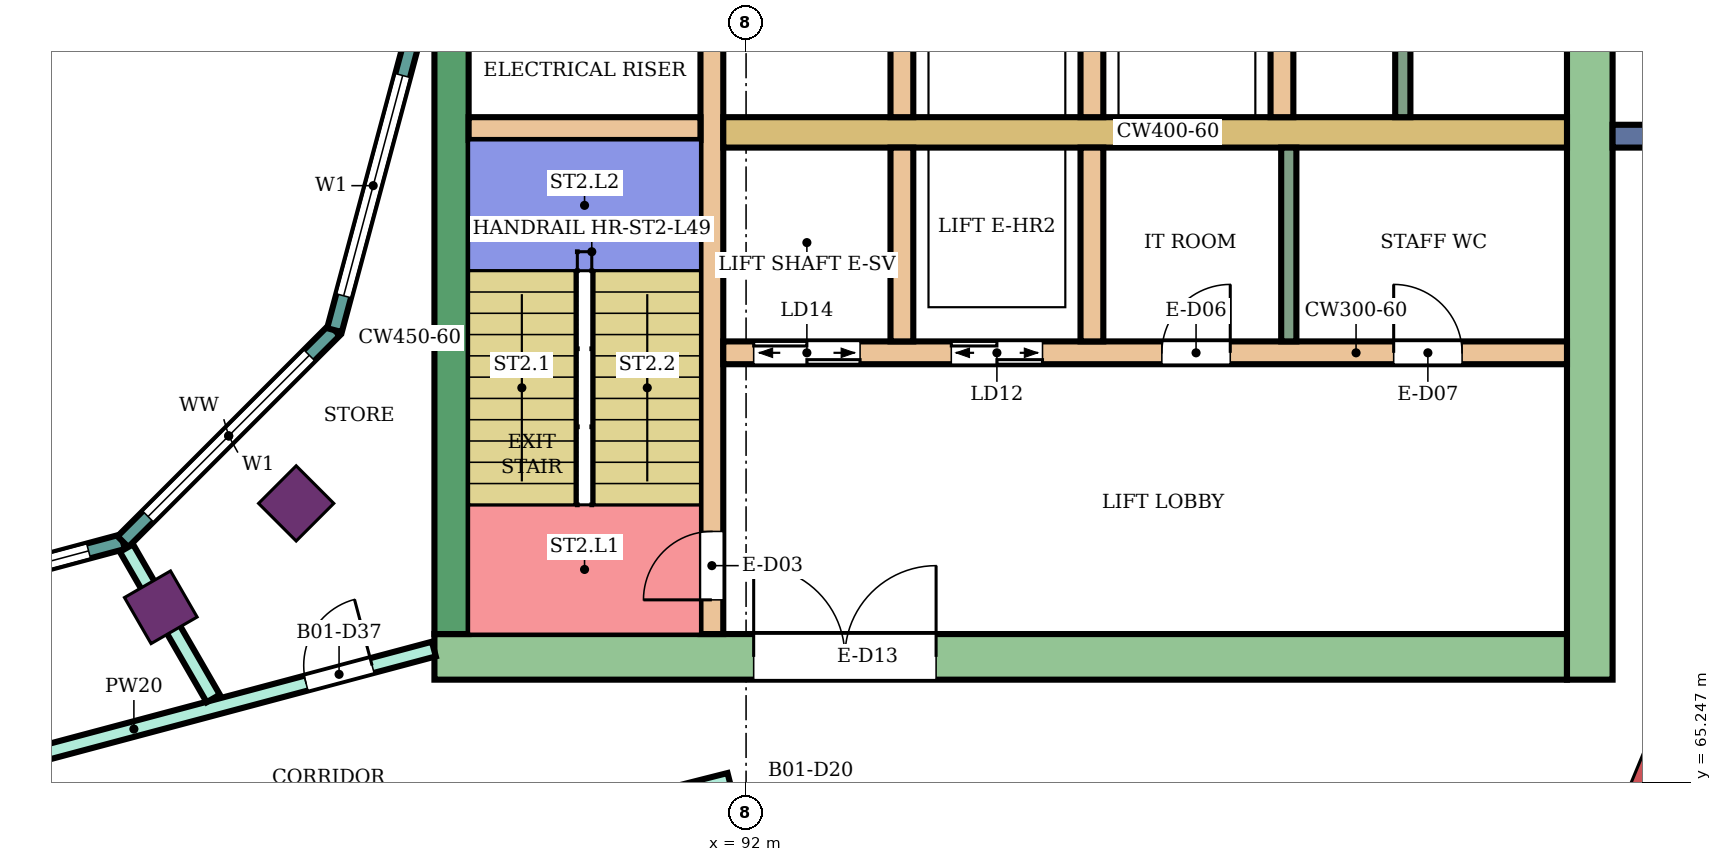
"""IFC4 building model, lengths in metres.
Left out: names, types, materials, properties, quantities, classifications, styles, units other than length and angle.
Written with IfcOpenShell. Run it as: python <this file> out.ifc"""

import sys

from ifc_helpers import new_model, si_unit, direction, frame, frame_2d, origin, origin_2d, place, context, subcontext, project, spatial, rectangle, extrude, element, fill, save


model = new_model("IFC4")
c1 = context("Model", 3, precision=1e-05, world=origin(), true_north=direction((0.0, 1.0)))
c2 = subcontext(c1, "Body", "Model", "MODEL_VIEW")
j1 = project(units=[si_unit("LENGTHUNIT", "METRE"), si_unit("PLANEANGLEUNIT", "RADIAN")], contexts=[c1])
p1 = place(None, origin())
s1 = spatial("IfcSite", under=j1, at=p1, CompositionType="ELEMENT")
p2 = place(p1, origin())
s2 = spatial("IfcBuilding", under=s1, at=p2, CompositionType="ELEMENT")
p3 = place(p2, frame((0.0, 0.0, 212.5)))
s3 = spatial("IfcBuildingStorey", under=s2, at=p3, CompositionType="ELEMENT", Elevation=212.5)
for number, where, z_axis, x_axis in (
    (1, (84.3, 67.552, 0.0), (0.0, 0.0, 1.0), (0.5, -0.866, 0.0)),
    (2, (86.081, 68.919, 0.0), (0.0, 0.0, 1.0), (0.707, -0.707, 0.0)),
):
    element("IfcColumn", number, at=place(p3, frame(where, z_axis=z_axis, x_axis=x_axis)), inside=s3, PredefinedType="COLUMN", context=c2, shape_type="SweptSolid", body=[
        extrude(rectangle(XDim=0.7, YDim=0.7, at=origin_2d()), origin(), (0.0, 0.0, 1.0), 4.2),
    ])
p4 = place(p3, frame((87.9, 66.9, 0.0), z_axis=(0.0, 0.0, 1.0), x_axis=(1.0, 0.0, 0.0)))
e3 = element("IfcWall", 3, at=p4, inside=s3, PredefinedType="SHEAR", context=c2, shape_type="SweptSolid", body=[
    extrude(rectangle(XDim=14.9, YDim=0.6, at=frame_2d((7.45, 0.0))), origin(), (0.0, 0.0, 1.0), 3.88),
])
p5 = place(p4, frame((4.2, 0.0, 0.0)))
e4 = element("IfcOpeningElement", 4, at=p5, cuts=e3, PredefinedType="OPENING", context=c2, shape_type="SweptSolid", body=[
    extrude(rectangle(XDim=2.4, YDim=2.4, at=frame_2d((1.2, 1.2))), frame((0.0, 0.31, 0.0), z_axis=(0.0, -1.0, 0.0), x_axis=(1.0, 0.0, 0.0)), (0.0, 0.0, 1.0), 0.62),
])
p6 = place(p3, frame((88.125, 67.2, 0.0), z_axis=(0.0, 0.0, 1.0), x_axis=(0.0, 1.0, 0.0)))
e5 = element("IfcWall", 5, at=p6, inside=s3, PredefinedType="SHEAR", context=c2, shape_type="SweptSolid", body=[
    extrude(rectangle(XDim=7.8, YDim=0.45, at=frame_2d((3.9, 0.0))), origin(), (0.0, 0.0, 1.0), 3.88),
])
p7 = place(p3, frame((103.1, 66.6, 0.0), z_axis=(0.0, 0.0, 1.0), x_axis=(0.0, 1.0, 0.0)))
e6 = element("IfcWall", 6, at=p7, inside=s3, PredefinedType="SHEAR", context=c2, shape_type="SweptSolid", body=[
    extrude(rectangle(XDim=16.8, YDim=0.6, at=frame_2d((8.4, 0.0))), origin(), (0.0, 0.0, 1.0), 3.88),
])
p8 = place(p3, frame((91.55, 67.2, 0.0), z_axis=(0.0, 0.0, 1.0), x_axis=(0.0, 1.0, 0.0)))
e7 = element("IfcWall", 7, at=p8, inside=s3, PredefinedType="SHEAR", context=c2, shape_type="SweptSolid", body=[
    extrude(rectangle(XDim=7.8, YDim=0.3, at=frame_2d((3.9, 0.0))), origin(), (0.0, 0.0, 1.0), 3.88),
])
p9 = place(p8, frame((0.45, 0.0, 0.0)))
e8 = element("IfcOpeningElement", 8, at=p9, cuts=e7, PredefinedType="OPENING", context=c2, shape_type="SweptSolid", body=[
    extrude(rectangle(XDim=0.9, YDim=2.1, at=frame_2d((0.45, 1.05))), frame((0.0, 0.16, 0.0), z_axis=(0.0, -1.0, 0.0), x_axis=(1.0, 0.0, 0.0)), (0.0, 0.0, 1.0), 0.32),
])
p10 = place(p3, frame((88.35, 73.85, 0.0), z_axis=(0.0, 0.0, 1.0), x_axis=(1.0, 0.0, 0.0)))
e9 = element("IfcWall", 9, at=p10, inside=s3, PredefinedType="SHEAR", context=c2, shape_type="SweptSolid", body=[
    extrude(rectangle(XDim=3.05, YDim=0.3, at=frame_2d((1.525, 0.0))), origin(), (0.0, 0.0, 1.0), 3.88),
])
p11 = place(p3, frame((91.7, 73.8, 0.0), z_axis=(0.0, 0.0, 1.0), x_axis=(1.0, 0.0, 0.0)))
e10 = element("IfcWall", 10, at=p11, inside=s3, PredefinedType="SHEAR", context=c2, shape_type="SweptSolid", body=[
    extrude(rectangle(XDim=11.1, YDim=0.4, at=frame_2d((5.55, 0.0))), origin(), (0.0, 0.0, 1.0), 3.88),
])
p12 = place(p3, frame((91.7, 70.9, 0.0), z_axis=(0.0, 0.0, 1.0), x_axis=(1.0, 0.0, 0.0)))
e11 = element("IfcWall", 11, at=p12, inside=s3, PredefinedType="SHEAR", context=c2, shape_type="SweptSolid", body=[
    extrude(rectangle(XDim=11.1, YDim=0.3, at=frame_2d((5.55, 0.0))), origin(), (0.0, 0.0, 1.0), 3.88),
])
p13 = place(p12, frame((0.4, 0.0, 0.0)))
e12 = element("IfcOpeningElement", 12, at=p13, cuts=e11, PredefinedType="OPENING", context=c2, shape_type="SweptSolid", body=[
    extrude(rectangle(XDim=1.4, YDim=2.1, at=frame_2d((0.7, 1.05))), frame((0.0, 0.16, 0.0), z_axis=(0.0, -1.0, 0.0), x_axis=(1.0, 0.0, 0.0)), (0.0, 0.0, 1.0), 0.32),
])
p14 = place(p12, frame((3.0, 0.0, 0.0)))
e13 = element("IfcOpeningElement", 13, at=p14, cuts=e11, PredefinedType="OPENING", context=c2, shape_type="SweptSolid", body=[
    extrude(rectangle(XDim=1.2, YDim=2.1, at=frame_2d((0.6, 1.05))), frame((0.0, 0.16, 0.0), z_axis=(0.0, -1.0, 0.0), x_axis=(1.0, 0.0, 0.0)), (0.0, 0.0, 1.0), 0.32),
])
p15 = place(p12, frame((5.77, 0.0, 0.0)))
e14 = element("IfcOpeningElement", 14, at=p15, cuts=e11, PredefinedType="OPENING", context=c2, shape_type="SweptSolid", body=[
    extrude(rectangle(XDim=0.9, YDim=2.1, at=frame_2d((0.45, 1.05))), frame((0.0, 0.16, 0.0), z_axis=(0.0, -1.0, 0.0), x_axis=(1.0, 0.0, 0.0)), (0.0, 0.0, 1.0), 0.32),
])
p16 = place(p12, frame((8.82, 0.0, 0.0)))
e15 = element("IfcOpeningElement", 15, at=p16, cuts=e11, PredefinedType="OPENING", context=c2, shape_type="SweptSolid", body=[
    extrude(rectangle(XDim=0.9, YDim=2.1, at=frame_2d((0.45, 1.05))), frame((0.0, 0.16, 0.0), z_axis=(0.0, -1.0, 0.0), x_axis=(1.0, 0.0, 0.0)), (0.0, 0.0, 1.0), 0.32),
])
for number, where, z_axis, x_axis in (
    (16, (94.05, 74.0, 0.0), (0.0, 0.0, 1.0), (0.0, 1.0, 0.0)),
    (17, (96.55, 74.0, 0.0), (0.0, 0.0, 1.0), (0.0, 1.0, 0.0)),
    (18, (99.05, 74.0, 0.0), (0.0, 0.0, 1.0), (0.0, 1.0, 0.0)),
    (19, (94.05, 71.05, 0.0), (0.0, 0.0, 1.0), (0.0, 1.0, 0.0)),
    (20, (96.55, 71.05, 0.0), (0.0, 0.0, 1.0), (0.0, 1.0, 0.0)),
):
    element("IfcWall", number, at=place(p3, frame(where, z_axis=z_axis, x_axis=x_axis)), inside=s3, PredefinedType="SHEAR", context=c2, shape_type="SweptSolid", body=[
        extrude(rectangle(XDim=2.55, YDim=0.3, at=frame_2d((1.275, 0.0))), origin(), (0.0, 0.0, 1.0), 3.88),
    ])
p17 = place(p3, frame((103.4, 73.75, 0.0), z_axis=(0.0, 0.0, 1.0), x_axis=(1.0, 0.0, 0.0)))
e21 = element("IfcWall", 21, at=p17, inside=s3, PredefinedType="NOTDEFINED", context=c2, shape_type="SweptSolid", body=[
    extrude(rectangle(XDim=2.416, YDim=0.3, at=frame_2d((1.208, 0.0))), origin(), (0.0, 0.0, 1.0), 4.2),
])
p18 = place(p3, frame((80.0, 67.396, 0.0), z_axis=(0.0, 0.0, 1.0), x_axis=(0.965933654434, 0.258789828301, 0.0)))
e22 = element("IfcWall", 22, at=p18, inside=s3, PredefinedType="NOTDEFINED", context=c2, shape_type="SweptSolid", body=[
    extrude(rectangle(XDim=3.936, YDim=0.2, at=frame_2d((1.968, 0.0))), origin(), (0.0, 0.0, 1.0), 4.2),
])
p19 = place(p18, frame((0.468, 0.0, 0.9)))
e23 = element("IfcOpeningElement", 23, at=p19, cuts=e22, PredefinedType="OPENING", context=c2, shape_type="SweptSolid", body=[
    extrude(rectangle(XDim=3.0, YDim=2.3, at=frame_2d((1.5, 1.15))), frame((0.0, 0.11, 0.0), z_axis=(0.0, -1.0, 0.0), x_axis=(1.0, 0.0, 0.0)), (0.0, 0.0, 1.0), 0.22),
])
p20 = place(p3, frame((83.802, 68.415, 0.0), z_axis=(0.0, 0.0, 1.0), x_axis=(0.707106781187, 0.707106781187, 0.0)))
e24 = element("IfcWall", 24, at=p20, inside=s3, PredefinedType="NOTDEFINED", context=c2, shape_type="SweptSolid", body=[
    extrude(rectangle(XDim=3.936, YDim=0.2, at=frame_2d((1.968, 0.0))), origin(), (0.0, 0.0, 1.0), 4.2),
])
p21 = place(p20, frame((0.468, 0.0, 0.9)))
e25 = element("IfcOpeningElement", 25, at=p21, cuts=e24, PredefinedType="OPENING", context=c2, shape_type="SweptSolid", body=[
    extrude(rectangle(XDim=3.0, YDim=2.3, at=frame_2d((1.5, 1.15))), frame((0.0, 0.11, 0.0), z_axis=(0.0, -1.0, 0.0), x_axis=(1.0, 0.0, 0.0)), (0.0, 0.0, 1.0), 0.22),
])
p22 = place(p3, frame((86.585, 71.198, 0.0), z_axis=(0.0, 0.0, 1.0), x_axis=(0.258789828301, 0.965933654434, 0.0)))
e26 = element("IfcWall", 26, at=p22, inside=s3, PredefinedType="NOTDEFINED", context=c2, shape_type="SweptSolid", body=[
    extrude(rectangle(XDim=3.936, YDim=0.2, at=frame_2d((1.968, 0.0))), origin(), (0.0, 0.0, 1.0), 4.2),
])
p23 = place(p22, frame((0.468, 0.0, 0.9)))
e27 = element("IfcOpeningElement", 27, at=p23, cuts=e26, PredefinedType="OPENING", context=c2, shape_type="SweptSolid", body=[
    extrude(rectangle(XDim=3.0, YDim=2.3, at=frame_2d((1.5, 1.15))), frame((0.0, 0.11, 0.0), z_axis=(0.0, -1.0, 0.0), x_axis=(1.0, 0.0, 0.0)), (0.0, 0.0, 1.0), 0.22),
])
p24 = place(p3, frame((80.0, 64.898, 0.0), z_axis=(0.0, 0.0, 1.0), x_axis=(0.966237419782, 0.257653349704, 0.0)))
e28 = element("IfcWall", 28, at=p24, inside=s3, PredefinedType="PARTITIONING", context=c2, shape_type="SweptSolid", body=[
    extrude(rectangle(XDim=8.169, YDim=0.2, at=frame_2d((4.084, 0.0))), origin(), (0.0, 0.0, 1.0), 3.75),
])
p25 = place(p24, frame((6.428, 0.0, 0.0)))
e29 = element("IfcOpeningElement", 29, at=p25, cuts=e28, PredefinedType="OPENING", context=c2, shape_type="SweptSolid", body=[
    extrude(rectangle(XDim=0.9, YDim=2.1, at=frame_2d((0.45, 1.05))), frame((0.0, 0.11, 0.0), z_axis=(0.0, -1.0, 0.0), x_axis=(1.0, 0.0, 0.0)), (0.0, 0.0, 1.0), 0.22),
])
p26 = place(p3, frame((83.848, 68.331, 0.0), z_axis=(0.0, 0.0, 1.0), x_axis=(0.499851978358, -0.866110847255, 0.0)))
e30 = element("IfcWall", 30, at=p26, inside=s3, PredefinedType="PARTITIONING", context=c2, shape_type="SweptSolid", body=[
    extrude(rectangle(XDim=2.284, YDim=0.2, at=frame_2d((1.142, 0.0))), origin(), (0.0, 0.0, 1.0), 3.75),
])
p27 = place(p3, frame((86.053, 63.826, 0.0), z_axis=(0.0, 0.0, 1.0), x_axis=(0.969490004987, 0.245130843083, 0.0)))
e31 = element("IfcWall", 31, at=p27, inside=s3, PredefinedType="PARTITIONING", context=c2, shape_type="SweptSolid", body=[
    extrude(rectangle(XDim=5.908, YDim=0.2, at=frame_2d((2.954, 0.0))), origin(), (0.0, 0.0, 1.0), 3.75),
])
for number, where, z_axis, x_axis in (
    (32, (100.64, 74.0, 0.0), (0.0, 0.0, 1.0), (0.0, 1.0, 0.0)),
    (33, (99.14, 71.05, 0.0), (0.0, 0.0, 1.0), (0.0, 1.0, 0.0)),
):
    element("IfcWall", number, at=place(p3, frame(where, z_axis=z_axis, x_axis=x_axis)), inside=s3, PredefinedType="PARTITIONING", context=c2, shape_type="SweptSolid", body=[
        extrude(rectangle(XDim=2.55, YDim=0.2, at=frame_2d((1.275, 0.0))), origin(), (0.0, 0.0, 1.0), 3.88),
    ])
p28 = place(p19, origin())
e34 = element("IfcWindow", 34, at=p28, inside=s3, PartitioningType="SINGLE_PANEL", PredefinedType="WINDOW", context=c2, shape_type="SweptSolid", body=[
    extrude(rectangle(XDim=3.0, YDim=2.3, at=frame_2d((1.5, 1.15))), frame((0.0, 0.03, 0.0), z_axis=(0.0, -1.0, 0.0), x_axis=(1.0, 0.0, 0.0)), (0.0, 0.0, 1.0), 0.06),
])
fill(e23, e34)
p29 = place(p21, origin())
e35 = element("IfcWindow", 35, at=p29, inside=s3, PartitioningType="SINGLE_PANEL", PredefinedType="WINDOW", context=c2, shape_type="SweptSolid", body=[
    extrude(rectangle(XDim=3.0, YDim=2.3, at=frame_2d((1.5, 1.15))), frame((0.0, 0.03, 0.0), z_axis=(0.0, -1.0, 0.0), x_axis=(1.0, 0.0, 0.0)), (0.0, 0.0, 1.0), 0.06),
])
fill(e25, e35)
p30 = place(p23, origin())
e36 = element("IfcWindow", 36, at=p30, inside=s3, PartitioningType="SINGLE_PANEL", PredefinedType="WINDOW", context=c2, shape_type="SweptSolid", body=[
    extrude(rectangle(XDim=3.0, YDim=2.3, at=frame_2d((1.5, 1.15))), frame((0.0, 0.03, 0.0), z_axis=(0.0, -1.0, 0.0), x_axis=(1.0, 0.0, 0.0)), (0.0, 0.0, 1.0), 0.06),
])
fill(e27, e36)
p31 = place(p25, origin())
e37 = element("IfcDoor", 37, at=p31, inside=s3, OperationType="SINGLE_SWING_RIGHT", PredefinedType="DOOR", context=c2, shape_type="SweptSolid", body=[
    extrude(rectangle(XDim=0.9, YDim=2.1, at=frame_2d((0.45, 1.05))), frame((0.0, 0.025, 0.0), z_axis=(0.0, -1.0, 0.0), x_axis=(1.0, 0.0, 0.0)), (0.0, 0.0, 1.0), 0.05),
])
fill(e29, e37)
p32 = place(p9, origin())
e38 = element("IfcDoor", 38, at=p32, inside=s3, OperationType="SINGLE_SWING_LEFT", PredefinedType="DOOR", context=c2, shape_type="SweptSolid", body=[
    extrude(rectangle(XDim=0.9, YDim=2.1, at=frame_2d((0.45, 1.05))), frame((0.0, 0.025, 0.0), z_axis=(0.0, -1.0, 0.0), x_axis=(1.0, 0.0, 0.0)), (0.0, 0.0, 1.0), 0.05),
])
fill(e8, e38)
p33 = place(p13, origin())
e39 = element("IfcDoor", 39, at=p33, inside=s3, OperationType="DOUBLE_DOOR_SLIDING", PredefinedType="DOOR", context=c2, shape_type="SweptSolid", body=[
    extrude(rectangle(XDim=1.4, YDim=2.1, at=frame_2d((0.7, 1.05))), frame((0.0, 0.025, 0.0), z_axis=(0.0, -1.0, 0.0), x_axis=(1.0, 0.0, 0.0)), (0.0, 0.0, 1.0), 0.05),
])
fill(e12, e39)
p34 = place(p14, origin())
e40 = element("IfcDoor", 40, at=p34, inside=s3, OperationType="DOUBLE_DOOR_SLIDING", PredefinedType="DOOR", context=c2, shape_type="SweptSolid", body=[
    extrude(rectangle(XDim=1.2, YDim=2.1, at=frame_2d((0.6, 1.05))), frame((0.0, 0.025, 0.0), z_axis=(0.0, -1.0, 0.0), x_axis=(1.0, 0.0, 0.0)), (0.0, 0.0, 1.0), 0.05),
])
fill(e13, e40)
p35 = place(p15, origin())
e41 = element("IfcDoor", 41, at=p35, inside=s3, OperationType="SINGLE_SWING_RIGHT", PredefinedType="DOOR", context=c2, shape_type="SweptSolid", body=[
    extrude(rectangle(XDim=0.9, YDim=2.1, at=frame_2d((0.45, 1.05))), frame((0.0, 0.025, 0.0), z_axis=(0.0, -1.0, 0.0), x_axis=(1.0, 0.0, 0.0)), (0.0, 0.0, 1.0), 0.05),
])
fill(e14, e41)
p36 = place(p16, origin())
e42 = element("IfcDoor", 42, at=p36, inside=s3, OperationType="SINGLE_SWING_LEFT", PredefinedType="DOOR", context=c2, shape_type="SweptSolid", body=[
    extrude(rectangle(XDim=0.9, YDim=2.1, at=frame_2d((0.45, 1.05))), frame((0.0, 0.025, 0.0), z_axis=(0.0, -1.0, 0.0), x_axis=(1.0, 0.0, 0.0)), (0.0, 0.0, 1.0), 0.05),
])
fill(e15, e42)
p37 = place(p5, origin())
e43 = element("IfcDoor", 43, at=p37, inside=s3, OperationType="DOUBLE_DOOR_SINGLE_SWING", PredefinedType="DOOR", context=c2, shape_type="SweptSolid", body=[
    extrude(rectangle(XDim=2.4, YDim=2.4, at=frame_2d((1.2, 1.2))), frame((0.0, 0.025, 0.0), z_axis=(0.0, -1.0, 0.0), x_axis=(1.0, 0.0, 0.0)), (0.0, 0.0, 1.0), 0.05),
])
fill(e4, e43)
save(model, sys.argv[1])
